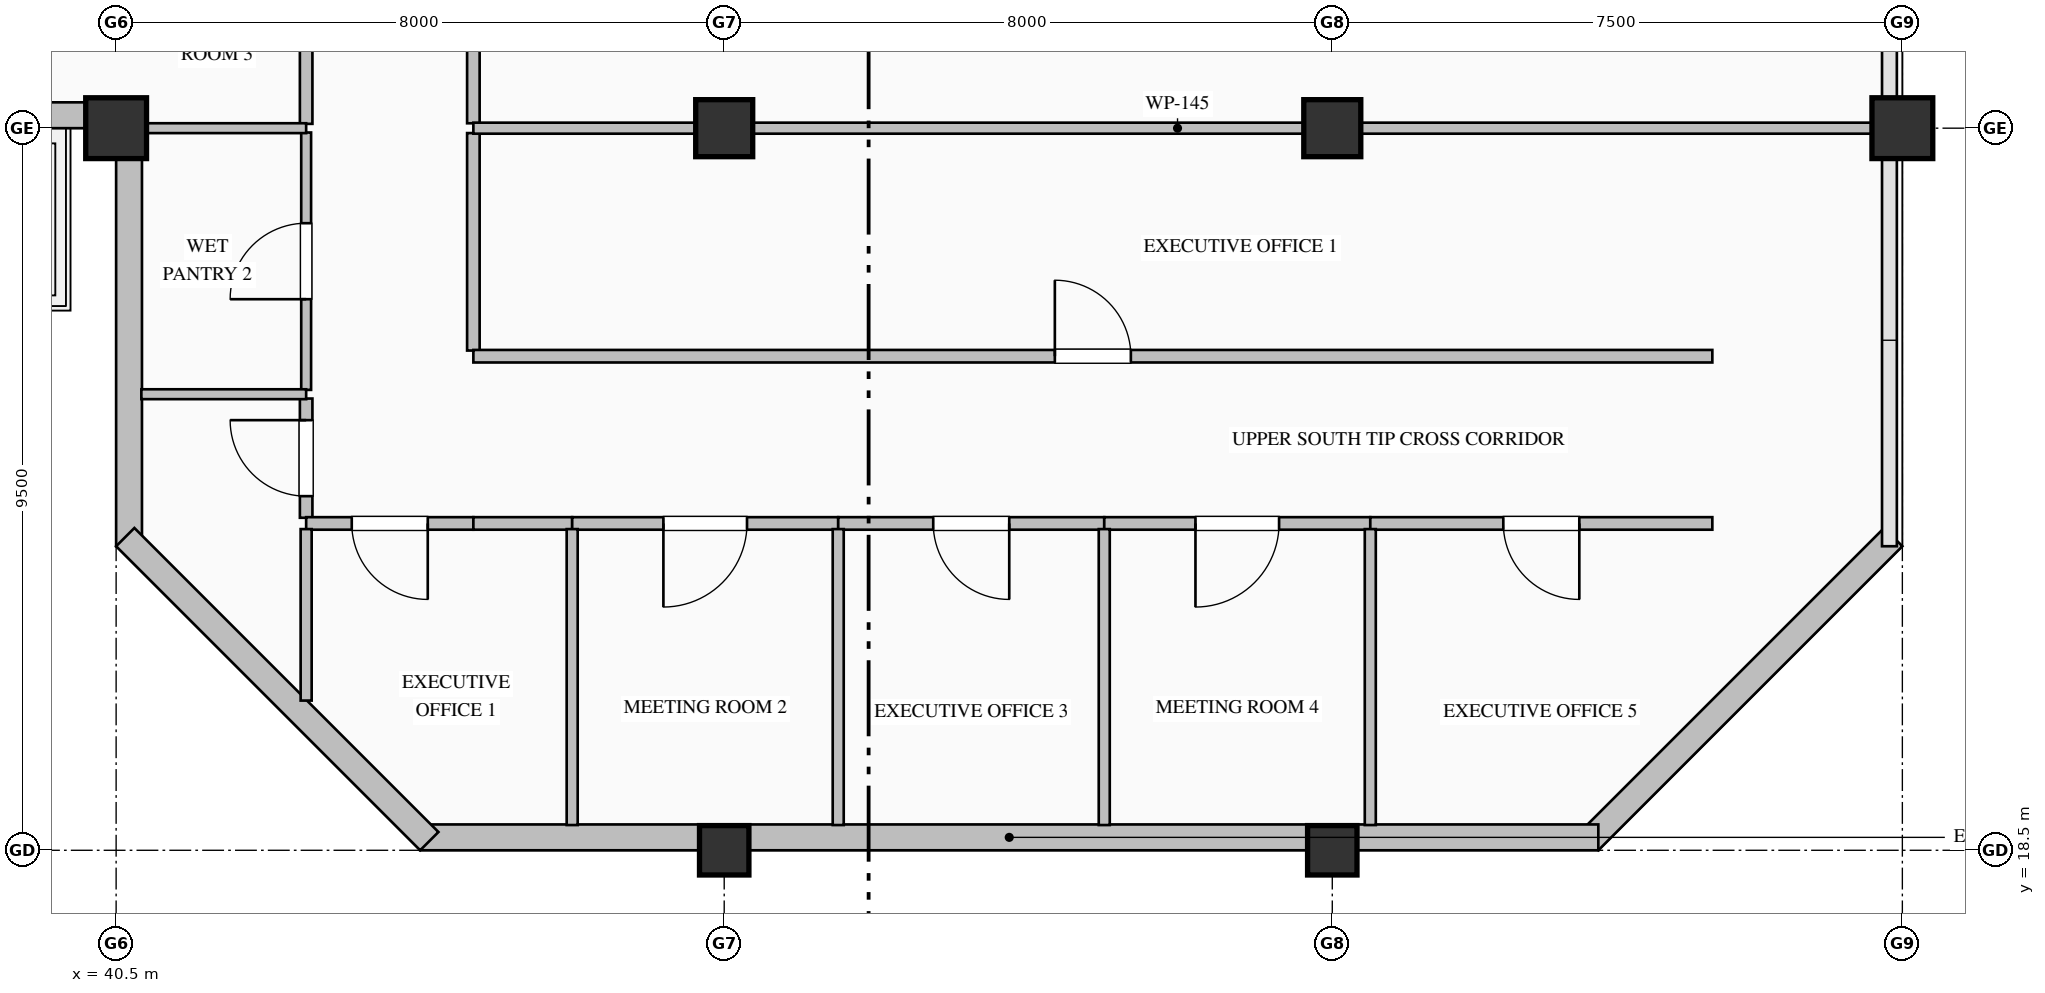
"""IFC4 building model, lengths in metres.
Left out: names, types, materials, properties, quantities, classifications, styles, units other than length and angle.
Written with IfcOpenShell. Run it as: python <this file> out.ifc"""

import sys

from ifc_helpers import new_model, si_unit, direction, frame, frame_2d, origin, origin_2d, place, context, subcontext, project, spatial, rectangle, hollow_rectangle, extrude, element, fill, save


model = new_model("IFC4")
c1 = context("Model", 3, precision=1e-05, world=origin(), true_north=direction((0.0, 1.0)))
c2 = subcontext(c1, "Body", "Model", "MODEL_VIEW")
j1 = project(units=[si_unit("LENGTHUNIT", "METRE"), si_unit("PLANEANGLEUNIT", "RADIAN")], contexts=[c1])
p1 = place(None, origin())
s1 = spatial("IfcSite", under=j1, at=p1, CompositionType="ELEMENT")
p2 = place(p1, origin())
s2 = spatial("IfcBuilding", under=s1, at=p2, CompositionType="ELEMENT")
p3 = place(p2, frame((0.0, 0.0, 291.2)))
s3 = spatial("IfcBuildingStorey", under=s2, at=p3, CompositionType="ELEMENT", Elevation=291.2)
p4 = place(p3, frame((40.5, 28.0, 0.0), z_axis=(0.0, 0.0, 1.0), x_axis=(1.0, 0.0, 0.0)))
e1 = element("IfcColumn", 1, at=p4, inside=s3, PredefinedType="COLUMN", context=c2, shape_type="SweptSolid", body=[
    extrude(hollow_rectangle(XDim=0.8, YDim=0.8, WallThickness=0.032, at=origin_2d()), origin(), (0.0, 0.0, 1.0), 4.0),
])
p5 = place(p3, frame((48.5, 18.5, 0.0), z_axis=(0.0, 0.0, 1.0), x_axis=(1.0, 0.0, 0.0)))
e2 = element("IfcColumn", 2, at=p5, inside=s3, PredefinedType="COLUMN", context=c2, shape_type="SweptSolid", body=[
    extrude(hollow_rectangle(XDim=0.65, YDim=0.65, WallThickness=0.028, at=origin_2d()), origin(), (0.0, 0.0, 1.0), 4.0),
])
p6 = place(p3, frame((48.5, 28.0, 0.0), z_axis=(0.0, 0.0, 1.0), x_axis=(1.0, 0.0, 0.0)))
e3 = element("IfcColumn", 3, at=p6, inside=s3, PredefinedType="COLUMN", context=c2, shape_type="SweptSolid", body=[
    extrude(rectangle(XDim=0.75, YDim=0.75, at=origin_2d()), origin(), (0.0, 0.0, 1.0), 4.0),
])
p7 = place(p3, frame((56.5, 18.5, 0.0), z_axis=(0.0, 0.0, 1.0), x_axis=(1.0, 0.0, 0.0)))
e4 = element("IfcColumn", 4, at=p7, inside=s3, PredefinedType="COLUMN", context=c2, shape_type="SweptSolid", body=[
    extrude(hollow_rectangle(XDim=0.65, YDim=0.65, WallThickness=0.028, at=origin_2d()), origin(), (0.0, 0.0, 1.0), 4.0),
])
p8 = place(p3, frame((56.5, 28.0, 0.0), z_axis=(0.0, 0.0, 1.0), x_axis=(1.0, 0.0, 0.0)))
e5 = element("IfcColumn", 5, at=p8, inside=s3, PredefinedType="COLUMN", context=c2, shape_type="SweptSolid", body=[
    extrude(rectangle(XDim=0.75, YDim=0.75, at=origin_2d()), origin(), (0.0, 0.0, 1.0), 4.0),
])
p9 = place(p3, frame((64.0, 28.0, 0.0), z_axis=(0.0, 0.0, 1.0), x_axis=(1.0, 0.0, 0.0)))
e6 = element("IfcColumn", 6, at=p9, inside=s3, PredefinedType="COLUMN", context=c2, shape_type="SweptSolid", body=[
    extrude(hollow_rectangle(XDim=0.8, YDim=0.8, WallThickness=0.032, at=origin_2d()), origin(), (0.0, 0.0, 1.0), 4.0),
])
p10 = place(p3, frame((40.67, 22.5, 0.0), z_axis=(0.0, 0.0, 1.0), x_axis=(0.0, 1.0, 0.0)))
e7 = element("IfcWall", 7, at=p10, inside=s3, PredefinedType="SOLIDWALL", context=c2, shape_type="SweptSolid", body=[
    extrude(rectangle(XDim=5.84, YDim=0.34, at=frame_2d((2.92, 0.0))), origin(), (0.0, 0.0, 1.0), 3.185),
])
p11 = place(p3, frame((40.52, 28.17, 0.0), z_axis=(0.0, 0.0, 1.0), x_axis=(-1.0, 0.0, 0.0)))
e8 = element("IfcWall", 8, at=p11, inside=s3, PredefinedType="SOLIDWALL", context=c2, shape_type="SweptSolid", body=[
    extrude(rectangle(XDim=20.02, YDim=0.34, at=frame_2d((10.01, 0.0))), origin(), (0.0, 0.0, 1.0), 3.185),
])
p12 = place(p11, frame((2.925, 0.0, 0.9)))
e9 = element("IfcOpeningElement", 9, at=p12, cuts=e8, PredefinedType="OPENING", context=c2, shape_type="SweptSolid", body=[
    extrude(rectangle(XDim=1.35, YDim=1.85, at=frame_2d((0.675, 0.925))), frame((0.0, 0.18, 0.0), z_axis=(0.0, -1.0, 0.0), x_axis=(1.0, 0.0, 0.0)), (0.0, 0.0, 1.0), 0.36),
])
p13 = place(p11, frame((13.725, 0.0, 0.9)))
e10 = element("IfcOpeningElement", 10, at=p13, cuts=e8, PredefinedType="OPENING", context=c2, shape_type="SweptSolid", body=[
    extrude(rectangle(XDim=1.35, YDim=1.85, at=frame_2d((0.675, 0.925))), frame((0.0, 0.18, 0.0), z_axis=(0.0, -1.0, 0.0), x_axis=(1.0, 0.0, 0.0)), (0.0, 0.0, 1.0), 0.36),
])
p14 = place(p11, frame((11.395, 0.0, 0.0)))
e11 = element("IfcOpeningElement", 11, at=p14, cuts=e8, PredefinedType="OPENING", context=c2, shape_type="SweptSolid", body=[
    extrude(rectangle(XDim=1.25, YDim=2.25, at=frame_2d((0.625, 1.125))), frame((0.0, 0.18, 0.0), z_axis=(0.0, -1.0, 0.0), x_axis=(1.0, 0.0, 0.0)), (0.0, 0.0, 1.0), 0.36),
])
p15 = place(p3, frame((63.88, 22.62, 0.0), z_axis=(0.0, 0.0, 1.0), x_axis=(-0.707106781187, -0.707106781187, 0.0)))
e12 = element("IfcWall", 12, at=p15, inside=s3, PredefinedType="SOLIDWALL", context=c2, shape_type="SweptSolid", body=[
    extrude(rectangle(XDim=5.657, YDim=0.34, at=frame_2d((2.828, 0.0))), origin(), (0.0, 0.0, 1.0), 3.785),
])
p16 = place(p3, frame((60.0, 18.67, 0.0), z_axis=(0.0, 0.0, 1.0), x_axis=(-1.0, 0.0, 0.0)))
e13 = element("IfcWall", 13, at=p16, inside=s3, PredefinedType="SOLIDWALL", context=c2, shape_type="SweptSolid", body=[
    extrude(rectangle(XDim=15.5, YDim=0.34, at=frame_2d((7.75, 0.0))), origin(), (0.0, 0.0, 1.0), 3.335),
])
p17 = place(p3, frame((44.62, 18.62, 0.0), z_axis=(0.0, 0.0, 1.0), x_axis=(-0.707106781187, 0.707106781187, 0.0)))
e14 = element("IfcWall", 14, at=p17, inside=s3, PredefinedType="SOLIDWALL", context=c2, shape_type="SweptSolid", body=[
    extrude(rectangle(XDim=5.657, YDim=0.34, at=frame_2d((2.828, 0.0))), origin(), (0.0, 0.0, 1.0), 3.785),
])
p18 = place(p3, frame((45.2, 27.936, 0.0), z_axis=(0.0, 0.0, 1.0), x_axis=(0.0, -1.0, 0.0)))
e15 = element("IfcWall", 15, at=p18, inside=s3, PredefinedType="PARTITIONING", context=c2, shape_type="SweptSolid", body=[
    extrude(rectangle(XDim=2.861, YDim=0.165, at=frame_2d((1.431, 0.0))), origin(), (0.0, 0.0, 1.0), 3.785),
])
p19 = place(p3, frame((45.2, 31.736, 0.0), z_axis=(0.0, 0.0, 1.0), x_axis=(0.0, -1.0, 0.0)))
e16 = element("IfcWall", 16, at=p19, inside=s3, PredefinedType="PARTITIONING", context=c2, shape_type="SweptSolid", body=[
    extrude(rectangle(XDim=3.671, YDim=0.165, at=frame_2d((1.835, 0.0))), origin(), (0.0, 0.0, 1.0), 3.785),
])
p20 = place(p19, frame((1.285, 0.0, 0.0)))
e17 = element("IfcOpeningElement", 17, at=p20, cuts=e16, PredefinedType="OPENING", context=c2, shape_type="SweptSolid", body=[
    extrude(rectangle(XDim=1.1, YDim=2.2, at=frame_2d((0.55, 1.1))), frame((0.0, 0.093, 0.0), z_axis=(0.0, -1.0, 0.0), x_axis=(1.0, 0.0, 0.0)), (0.0, 0.0, 1.0), 0.185),
])
p21 = place(p3, frame((43.0, 22.875, 0.0), z_axis=(0.0, 0.0, 1.0), x_axis=(0.0, 1.0, 0.0)))
e18 = element("IfcWall", 18, at=p21, inside=s3, PredefinedType="PARTITIONING", context=c2, shape_type="SweptSolid", body=[
    extrude(rectangle(XDim=1.569, YDim=0.165, at=frame_2d((0.784, 0.0))), origin(), (0.0, 0.0, 1.0), 3.785),
])
p22 = place(p21, frame((0.284, 0.0, 0.0)))
e19 = element("IfcOpeningElement", 19, at=p22, cuts=e18, PredefinedType="OPENING", context=c2, shape_type="SweptSolid", body=[
    extrude(rectangle(XDim=1.0, YDim=2.15, at=frame_2d((0.5, 1.075))), frame((0.0, 0.093, 0.0), z_axis=(0.0, -1.0, 0.0), x_axis=(1.0, 0.0, 0.0)), (0.0, 0.0, 1.0), 0.185),
])
p23 = place(p3, frame((43.0, 24.557, 0.0), z_axis=(0.0, 0.0, 1.0), x_axis=(0.0, 1.0, 0.0)))
e20 = element("IfcWall", 20, at=p23, inside=s3, PredefinedType="PARTITIONING", context=c2, shape_type="SweptSolid", body=[
    extrude(rectangle(XDim=3.386, YDim=0.13, at=frame_2d((1.693, 0.0))), origin(), (0.0, 0.0, 1.0), 3.785),
])
p24 = place(p23, frame((1.193, 0.0, 0.0)))
e21 = element("IfcOpeningElement", 21, at=p24, cuts=e20, PredefinedType="OPENING", context=c2, shape_type="SweptSolid", body=[
    extrude(rectangle(XDim=1.0, YDim=2.15, at=frame_2d((0.5, 1.075))), frame((0.0, 0.075, 0.0), z_axis=(0.0, -1.0, 0.0), x_axis=(1.0, 0.0, 0.0)), (0.0, 0.0, 1.0), 0.15),
])
p25 = place(p3, frame((43.0, 28.057, 0.0), z_axis=(0.0, 0.0, 1.0), x_axis=(0.0, 1.0, 0.0)))
e22 = element("IfcWall", 22, at=p25, inside=s3, PredefinedType="PARTITIONING", context=c2, shape_type="SweptSolid", body=[
    extrude(rectangle(XDim=5.469, YDim=0.165, at=frame_2d((2.734, 0.0))), origin(), (0.0, 0.0, 1.0), 3.785),
])
p26 = place(p25, frame((2.234, 0.0, 0.0)))
e23 = element("IfcOpeningElement", 23, at=p26, cuts=e22, PredefinedType="OPENING", context=c2, shape_type="SweptSolid", body=[
    extrude(rectangle(XDim=1.0, YDim=2.15, at=frame_2d((0.5, 1.075))), frame((0.0, 0.093, 0.0), z_axis=(0.0, -1.0, 0.0), x_axis=(1.0, 0.0, 0.0)), (0.0, 0.0, 1.0), 0.185),
])
p27 = place(p3, frame((45.2, 22.8, 0.0), z_axis=(0.0, 0.0, 1.0), x_axis=(-1.0, 0.0, 0.0)))
e24 = element("IfcWall", 24, at=p27, inside=s3, PredefinedType="PARTITIONING", context=c2, shape_type="SweptSolid", body=[
    extrude(rectangle(XDim=2.2, YDim=0.165, at=frame_2d((1.1, 0.0))), origin(), (0.0, 0.0, 1.0), 3.785),
])
p28 = place(p27, frame((0.6, 0.0, 0.0)))
e25 = element("IfcOpeningElement", 25, at=p28, cuts=e24, PredefinedType="OPENING", context=c2, shape_type="SweptSolid", body=[
    extrude(rectangle(XDim=1.0, YDim=2.15, at=frame_2d((0.5, 1.075))), frame((0.0, 0.093, 0.0), z_axis=(0.0, -1.0, 0.0), x_axis=(1.0, 0.0, 0.0)), (0.0, 0.0, 1.0), 0.185),
])
p29 = place(p3, frame((45.2, 25.0, 0.0), z_axis=(0.0, 0.0, 1.0), x_axis=(1.0, 0.0, 0.0)))
e26 = element("IfcWall", 26, at=p29, inside=s3, PredefinedType="PARTITIONING", context=c2, shape_type="SweptSolid", body=[
    extrude(rectangle(XDim=16.3, YDim=0.165, at=frame_2d((8.15, 0.0))), origin(), (0.0, 0.0, 1.0), 3.785),
])
p30 = place(p29, frame((7.65, 0.0, 0.0)))
e27 = element("IfcOpeningElement", 27, at=p30, cuts=e26, PredefinedType="OPENING", context=c2, shape_type="SweptSolid", body=[
    extrude(rectangle(XDim=1.0, YDim=2.15, at=frame_2d((0.5, 1.075))), frame((0.0, 0.093, 0.0), z_axis=(0.0, -1.0, 0.0), x_axis=(1.0, 0.0, 0.0)), (0.0, 0.0, 1.0), 0.185),
])
p31 = place(p3, frame((46.5, 22.8, 0.0), z_axis=(0.0, 0.0, 1.0), x_axis=(-1.0, 0.0, 0.0)))
e28 = element("IfcWall", 28, at=p31, inside=s3, PredefinedType="PARTITIONING", context=c2, shape_type="SweptSolid", body=[
    extrude(rectangle(XDim=1.3, YDim=0.165, at=frame_2d((0.65, 0.0))), origin(), (0.0, 0.0, 1.0), 3.785),
])
p32 = place(p3, frame((50.0, 22.8, 0.0), z_axis=(0.0, 0.0, 1.0), x_axis=(-1.0, 0.0, 0.0)))
e29 = element("IfcWall", 29, at=p32, inside=s3, PredefinedType="PARTITIONING", context=c2, shape_type="SweptSolid", body=[
    extrude(rectangle(XDim=3.5, YDim=0.165, at=frame_2d((1.75, 0.0))), origin(), (0.0, 0.0, 1.0), 3.785),
])
p33 = place(p32, frame((1.2, 0.0, 0.0)))
e30 = element("IfcOpeningElement", 30, at=p33, cuts=e29, PredefinedType="OPENING", context=c2, shape_type="SweptSolid", body=[
    extrude(rectangle(XDim=1.1, YDim=2.2, at=frame_2d((0.55, 1.1))), frame((0.0, 0.093, 0.0), z_axis=(0.0, -1.0, 0.0), x_axis=(1.0, 0.0, 0.0)), (0.0, 0.0, 1.0), 0.185),
])
p34 = place(p3, frame((53.5, 22.8, 0.0), z_axis=(0.0, 0.0, 1.0), x_axis=(-1.0, 0.0, 0.0)))
e31 = element("IfcWall", 31, at=p34, inside=s3, PredefinedType="PARTITIONING", context=c2, shape_type="SweptSolid", body=[
    extrude(rectangle(XDim=3.5, YDim=0.165, at=frame_2d((1.75, 0.0))), origin(), (0.0, 0.0, 1.0), 3.785),
])
p35 = place(p34, frame((1.25, 0.0, 0.0)))
e32 = element("IfcOpeningElement", 32, at=p35, cuts=e31, PredefinedType="OPENING", context=c2, shape_type="SweptSolid", body=[
    extrude(rectangle(XDim=1.0, YDim=2.15, at=frame_2d((0.5, 1.075))), frame((0.0, 0.093, 0.0), z_axis=(0.0, -1.0, 0.0), x_axis=(1.0, 0.0, 0.0)), (0.0, 0.0, 1.0), 0.185),
])
p36 = place(p3, frame((57.0, 22.8, 0.0), z_axis=(0.0, 0.0, 1.0), x_axis=(-1.0, 0.0, 0.0)))
e33 = element("IfcWall", 33, at=p36, inside=s3, PredefinedType="PARTITIONING", context=c2, shape_type="SweptSolid", body=[
    extrude(rectangle(XDim=3.5, YDim=0.165, at=frame_2d((1.75, 0.0))), origin(), (0.0, 0.0, 1.0), 3.785),
])
p37 = place(p36, frame((1.2, 0.0, 0.0)))
e34 = element("IfcOpeningElement", 34, at=p37, cuts=e33, PredefinedType="OPENING", context=c2, shape_type="SweptSolid", body=[
    extrude(rectangle(XDim=1.1, YDim=2.2, at=frame_2d((0.55, 1.1))), frame((0.0, 0.093, 0.0), z_axis=(0.0, -1.0, 0.0), x_axis=(1.0, 0.0, 0.0)), (0.0, 0.0, 1.0), 0.185),
])
p38 = place(p3, frame((61.5, 22.8, 0.0), z_axis=(0.0, 0.0, 1.0), x_axis=(-1.0, 0.0, 0.0)))
e35 = element("IfcWall", 35, at=p38, inside=s3, PredefinedType="PARTITIONING", context=c2, shape_type="SweptSolid", body=[
    extrude(rectangle(XDim=4.5, YDim=0.165, at=frame_2d((2.25, 0.0))), origin(), (0.0, 0.0, 1.0), 3.785),
])
p39 = place(p38, frame((1.75, 0.0, 0.0)))
e36 = element("IfcOpeningElement", 36, at=p39, cuts=e35, PredefinedType="OPENING", context=c2, shape_type="SweptSolid", body=[
    extrude(rectangle(XDim=1.0, YDim=2.15, at=frame_2d((0.5, 1.075))), frame((0.0, 0.093, 0.0), z_axis=(0.0, -1.0, 0.0), x_axis=(1.0, 0.0, 0.0)), (0.0, 0.0, 1.0), 0.185),
])
p40 = place(p3, frame((45.2, 28.0, 0.0), z_axis=(0.0, 0.0, 1.0), x_axis=(1.0, 0.0, 0.0)))
e37 = element("IfcWall", 37, at=p40, inside=s3, PredefinedType="PARTITIONING", context=c2, shape_type="SweptSolid", body=[
    extrude(rectangle(XDim=18.528, YDim=0.145, at=frame_2d((9.264, 0.0))), origin(), (0.0, 0.0, 1.0), 3.177),
])
p41 = place(p3, frame((40.832, 24.5, 0.0), z_axis=(0.0, 0.0, 1.0), x_axis=(1.0, 0.0, 0.0)))
e38 = element("IfcWall", 38, at=p41, inside=s3, PredefinedType="PARTITIONING", context=c2, shape_type="SweptSolid", body=[
    extrude(rectangle(XDim=2.168, YDim=0.13, at=frame_2d((1.084, 0.0))), origin(), (0.0, 0.0, 1.0), 3.785),
])
p42 = place(p3, frame((43.0, 22.726, 0.0), z_axis=(0.0, 0.0, 1.0), x_axis=(0.0, -1.0, 0.0)))
e39 = element("IfcWall", 39, at=p42, inside=s3, PredefinedType="PARTITIONING", context=c2, shape_type="SweptSolid", body=[
    extrude(rectangle(XDim=2.256, YDim=0.145, at=frame_2d((1.128, 0.0))), origin(), (0.0, 0.0, 1.0), 3.785),
])
p43 = place(p3, frame((40.832, 28.0, 0.0), z_axis=(0.0, 0.0, 1.0), x_axis=(1.0, 0.0, 0.0)))
e40 = element("IfcWall", 40, at=p43, inside=s3, PredefinedType="PARTITIONING", context=c2, shape_type="SweptSolid", body=[
    extrude(rectangle(XDim=2.168, YDim=0.13, at=frame_2d((1.084, 0.0))), origin(), (0.0, 0.0, 1.0), 3.177),
])
for number, where, z_axis, x_axis in (
    (41, (46.5, 22.726, 0.0), (0.0, 0.0, 1.0), (0.0, -1.0, 0.0)),
    (42, (50.0, 22.726, 0.0), (0.0, 0.0, 1.0), (0.0, -1.0, 0.0)),
    (43, (53.5, 22.726, 0.0), (0.0, 0.0, 1.0), (0.0, -1.0, 0.0)),
    (44, (57.0, 22.726, 0.0), (0.0, 0.0, 1.0), (0.0, -1.0, 0.0)),
):
    element("IfcWall", number, at=place(p3, frame(where, z_axis=z_axis, x_axis=x_axis)), inside=s3, PredefinedType="PARTITIONING", context=c2, shape_type="SweptSolid", body=[
        extrude(rectangle(XDim=3.894, YDim=0.145, at=frame_2d((1.947, 0.0))), origin(), (0.0, 0.0, 1.0), 3.785),
    ])
p44 = place(p30, origin())
e45 = element("IfcDoor", 45, at=p44, inside=s3, OperationType="SINGLE_SWING_LEFT", PredefinedType="DOOR", context=c2, shape_type="SweptSolid", body=[
    extrude(rectangle(XDim=1.0, YDim=2.15, at=frame_2d((0.5, 1.075))), frame((0.0, 0.025, 0.0), z_axis=(0.0, -1.0, 0.0), x_axis=(1.0, 0.0, 0.0)), (0.0, 0.0, 1.0), 0.05),
])
fill(e27, e45)
p45 = place(p22, origin())
e46 = element("IfcDoor", 46, at=p45, inside=s3, OperationType="SINGLE_SWING_RIGHT", PredefinedType="DOOR", context=c2, shape_type="SweptSolid", body=[
    extrude(rectangle(XDim=1.0, YDim=2.15, at=frame_2d((0.5, 1.075))), frame((0.0, 0.025, 0.0), z_axis=(0.0, -1.0, 0.0), x_axis=(1.0, 0.0, 0.0)), (0.0, 0.0, 1.0), 0.05),
])
fill(e19, e46)
p46 = place(p24, origin())
e47 = element("IfcDoor", 47, at=p46, inside=s3, OperationType="SINGLE_SWING_LEFT", PredefinedType="DOOR", context=c2, shape_type="SweptSolid", body=[
    extrude(rectangle(XDim=1.0, YDim=2.15, at=frame_2d((0.5, 1.075))), frame((0.0, 0.025, 0.0), z_axis=(0.0, -1.0, 0.0), x_axis=(1.0, 0.0, 0.0)), (0.0, 0.0, 1.0), 0.05),
])
fill(e21, e47)
p47 = place(p28, origin())
e48 = element("IfcDoor", 48, at=p47, inside=s3, OperationType="SINGLE_SWING_LEFT", PredefinedType="DOOR", context=c2, shape_type="SweptSolid", body=[
    extrude(rectangle(XDim=1.0, YDim=2.15, at=frame_2d((0.5, 1.075))), frame((0.0, 0.025, 0.0), z_axis=(0.0, -1.0, 0.0), x_axis=(1.0, 0.0, 0.0)), (0.0, 0.0, 1.0), 0.05),
])
fill(e25, e48)
p48 = place(p33, origin())
e49 = element("IfcDoor", 49, at=p48, inside=s3, OperationType="SINGLE_SWING_RIGHT", PredefinedType="DOOR", context=c2, shape_type="SweptSolid", body=[
    extrude(rectangle(XDim=1.1, YDim=2.2, at=frame_2d((0.55, 1.1))), frame((0.0, 0.025, 0.0), z_axis=(0.0, -1.0, 0.0), x_axis=(1.0, 0.0, 0.0)), (0.0, 0.0, 1.0), 0.05),
])
fill(e30, e49)
p49 = place(p35, origin())
e50 = element("IfcDoor", 50, at=p49, inside=s3, OperationType="SINGLE_SWING_LEFT", PredefinedType="DOOR", context=c2, shape_type="SweptSolid", body=[
    extrude(rectangle(XDim=1.0, YDim=2.15, at=frame_2d((0.5, 1.075))), frame((0.0, 0.025, 0.0), z_axis=(0.0, -1.0, 0.0), x_axis=(1.0, 0.0, 0.0)), (0.0, 0.0, 1.0), 0.05),
])
fill(e32, e50)
p50 = place(p37, origin())
e51 = element("IfcDoor", 51, at=p50, inside=s3, OperationType="SINGLE_SWING_RIGHT", PredefinedType="DOOR", context=c2, shape_type="SweptSolid", body=[
    extrude(rectangle(XDim=1.1, YDim=2.2, at=frame_2d((0.55, 1.1))), frame((0.0, 0.025, 0.0), z_axis=(0.0, -1.0, 0.0), x_axis=(1.0, 0.0, 0.0)), (0.0, 0.0, 1.0), 0.05),
])
fill(e34, e51)
p51 = place(p39, origin())
e52 = element("IfcDoor", 52, at=p51, inside=s3, OperationType="SINGLE_SWING_LEFT", PredefinedType="DOOR", context=c2, shape_type="SweptSolid", body=[
    extrude(rectangle(XDim=1.0, YDim=2.15, at=frame_2d((0.5, 1.075))), frame((0.0, 0.025, 0.0), z_axis=(0.0, -1.0, 0.0), x_axis=(1.0, 0.0, 0.0)), (0.0, 0.0, 1.0), 0.05),
])
fill(e36, e52)
save(model, sys.argv[1])
